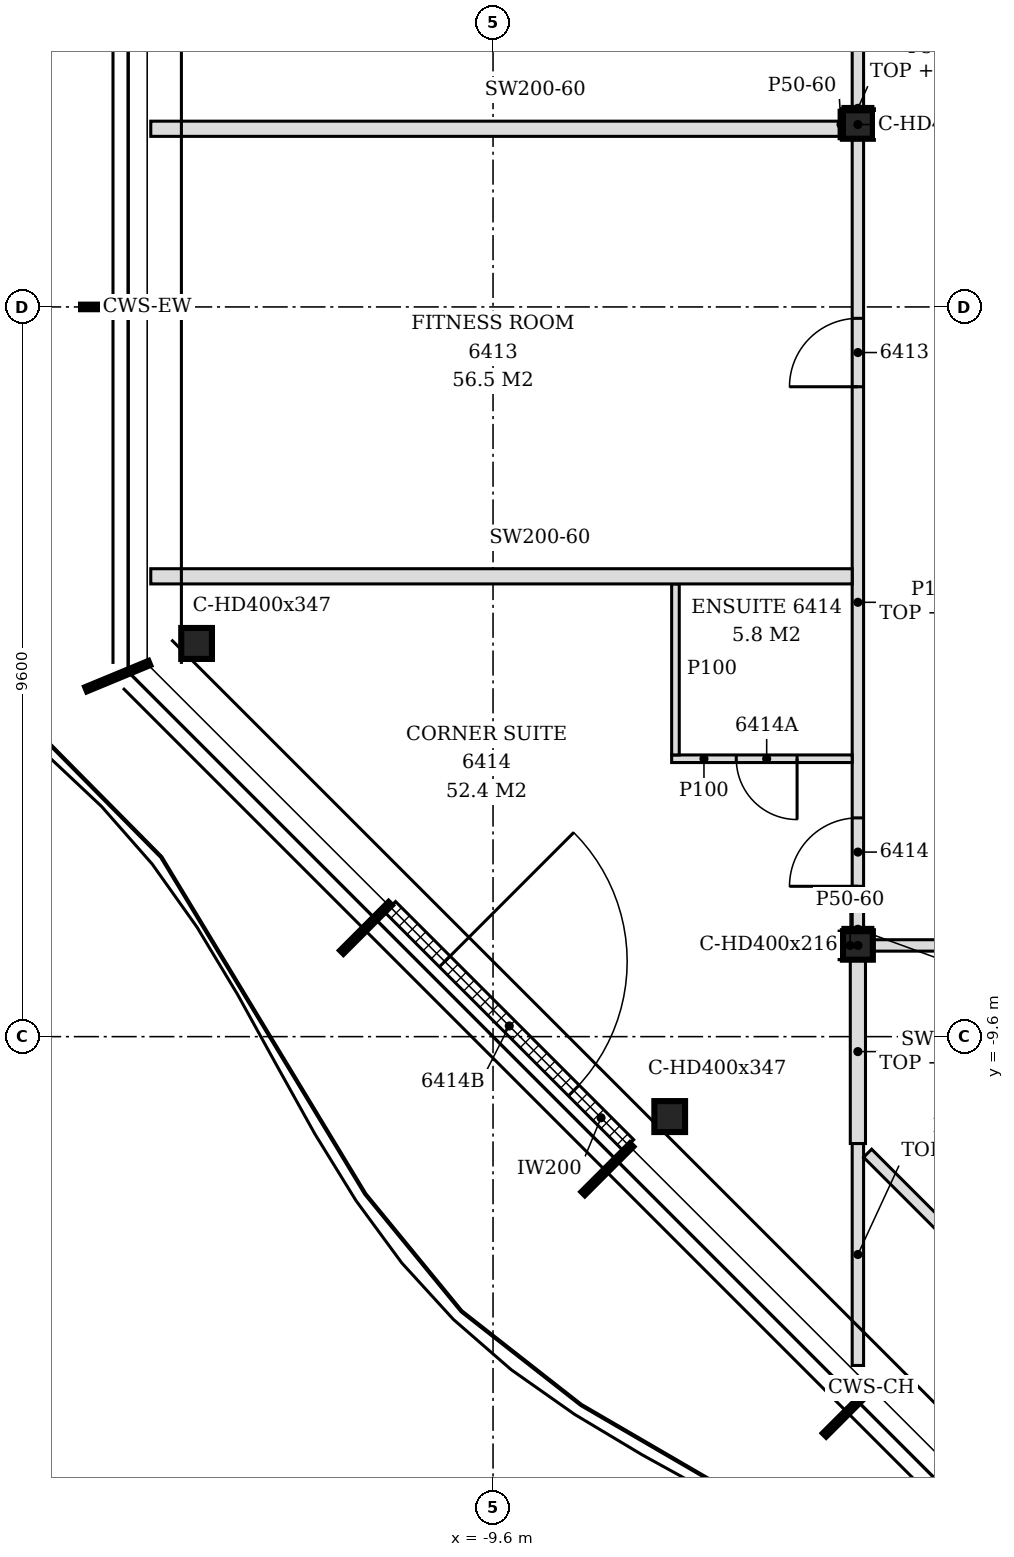
"""IFC4 building model, lengths in metres.
Left out: names, types, materials, properties, quantities, classifications, styles, units other than length and angle.
Written with IfcOpenShell. Run it as: python <this file> out.ifc"""

import sys

from ifc_helpers import new_model, si_unit, direction, frame, frame_2d, origin, origin_2d, place, context, subcontext, project, spatial, polyline, rectangle, i_section, outline, extrude, element, fill, save


model = new_model("IFC4")
c1 = context("Model", 3, precision=1e-05, world=origin(), true_north=direction((0.0, 1.0)))
c2 = subcontext(c1, "Body", "Model", "MODEL_VIEW")
j1 = project(units=[si_unit("LENGTHUNIT", "METRE"), si_unit("PLANEANGLEUNIT", "RADIAN")], contexts=[c1])
p1 = place(None, origin())
s1 = spatial("IfcSite", under=j1, at=p1, CompositionType="ELEMENT")
p2 = place(p1, origin())
s2 = spatial("IfcBuilding", under=s1, at=p2, CompositionType="ELEMENT")
p3 = place(p2, frame((0.0, 0.0, 250.2)))
s3 = spatial("IfcBuildingStorey", under=s2, at=p3, CompositionType="ELEMENT", Elevation=250.2)
for number, where, z_axis, x_axis in (
    (1, (-13.5, -4.427, -0.15), (0.0, 0.0, 1.0), (1.0, 0.0, 0.0)),
    (2, (-7.276, -10.652, -0.15), (0.0, 0.0, 1.0), (1.0, 0.0, 0.0)),
):
    element("IfcColumn", number, at=place(p3, frame(where, z_axis=z_axis, x_axis=x_axis)), inside=s3, PredefinedType="COLUMN", context=c2, shape_type="SweptSolid", body=[
        extrude(i_section(OverallWidth=0.404, OverallDepth=0.407, WebThickness=0.027, FlangeThickness=0.044, FilletRadius=0.015, at=origin_2d()), origin(), (0.0, 0.0, 1.0), 3.6),
    ])
for number, where, z_axis, x_axis in (
    (3, (-4.8, -8.4, -0.15), (0.0, 0.0, 1.0), (1.0, 0.0, 0.0)),
    (4, (-4.8, 2.4, -0.15), (0.0, 0.0, 1.0), (1.0, 0.0, 0.0)),
):
    element("IfcColumn", number, at=place(p3, frame(where, z_axis=z_axis, x_axis=x_axis)), inside=s3, PredefinedType="COLUMN", context=c2, shape_type="SweptSolid", body=[
        extrude(i_section(OverallWidth=0.394, OverallDepth=0.375, WebThickness=0.017, FlangeThickness=0.028, FilletRadius=0.015, at=origin_2d()), origin(), (0.0, 0.0, 1.0), 3.6),
    ])
p4 = place(p3, frame((-10.953, -7.893, 0.0), z_axis=(0.0, 0.0, 1.0), x_axis=(0.707106781187, -0.707106781187, 0.0)))
e5 = element("IfcWall", 5, at=p4, inside=s3, PredefinedType="NOTDEFINED", context=c2, shape_type="SweptSolid", body=[
    extrude(rectangle(XDim=4.431, YDim=0.2, at=frame_2d((2.215, 0.0))), origin(), (0.0, 0.0, 1.0), 3.45),
])
p5 = place(p4, frame((1.015, 0.0, 0.0)))
e6 = element("IfcOpeningElement", 6, at=p5, cuts=e5, PredefinedType="OPENING", context=c2, shape_type="SweptSolid", body=[
    extrude(rectangle(XDim=2.4, YDim=2.4, at=frame_2d((1.2, 1.2))), frame((0.0, 0.11, 0.0), z_axis=(0.0, -1.0, 0.0), x_axis=(1.0, 0.0, 0.0)), (0.0, 0.0, 1.0), 0.22),
])
p6 = place(p3, frame((-4.8, -13.926, 0.0), z_axis=(0.0, 0.0, 1.0), x_axis=(0.0, 1.0, 0.0)))
e7 = element("IfcWall", 7, at=p6, inside=s3, PredefinedType="PARTITIONING", context=c2, shape_type="SweptSolid", body=[
    extrude(outline(polyline([(0.0, 0.0), (2.92, 0.0), (2.92, 3.03), (1.369, 3.03), (1.367, 2.63), (0.229, 2.63), (0.227, 3.03), (0.0, 3.03), (0.0, 0.0)])), frame((0.0, 0.075, 0.0), z_axis=(0.0, -1.0, 0.0), x_axis=(1.0, 0.0, 0.0)), (0.0, 0.0, 1.0), 0.15),
])
p7 = place(p3, frame((-2.734, -13.072, 0.0), z_axis=(0.0, 0.0, 1.0), x_axis=(-0.707151316332, 0.707062243236, 0.0)))
e8 = element("IfcWall", 8, at=p7, inside=s3, PredefinedType="PARTITIONING", context=c2, shape_type="SweptSolid", body=[
    extrude(rectangle(XDim=2.741, YDim=0.15, at=frame_2d((1.371, 0.0))), origin(), (0.0, 0.0, 1.0), 3.03),
])
p8 = place(p3, frame((-4.8, -11.006, 0.0), z_axis=(0.0, 0.0, 1.0), x_axis=(0.0, 1.0, 0.0)))
e9 = element("IfcWall", 9, at=p8, inside=s3, PredefinedType="PARTITIONING", context=c2, shape_type="SweptSolid", body=[
    extrude(rectangle(XDim=2.419, YDim=0.2, at=frame_2d((1.209, 0.0))), origin(), (0.0, 0.0, 1.0), 3.03),
])
p9 = place(p3, frame((-4.603, -8.4, 0.0), z_axis=(0.0, 0.0, 1.0), x_axis=(1.0, 0.0, 0.0)))
e10 = element("IfcWall", 10, at=p9, inside=s3, PredefinedType="PARTITIONING", context=c2, shape_type="SweptSolid", body=[
    extrude(rectangle(XDim=4.678, YDim=0.15, at=frame_2d((2.339, 0.0))), origin(), (0.0, 0.0, 1.0), 2.83),
])
p10 = place(p9, frame((1.753, 0.0, 0.0)))
e11 = element("IfcOpeningElement", 11, at=p10, cuts=e10, PredefinedType="OPENING", context=c2, shape_type="SweptSolid", body=[
    extrude(rectangle(XDim=0.9, YDim=2.1, at=frame_2d((0.45, 1.05))), frame((0.0, 0.085, 0.0), z_axis=(0.0, -1.0, 0.0), x_axis=(1.0, 0.0, 0.0)), (0.0, 0.0, 1.0), 0.17),
])
p11 = place(p3, frame((-4.8, -8.212, 0.0), z_axis=(0.0, 0.0, 1.0), x_axis=(0.0, 1.0, 0.0)))
e12 = element("IfcWall", 12, at=p11, inside=s3, PredefinedType="PARTITIONING", context=c2, shape_type="SweptSolid", body=[
    extrude(rectangle(XDim=10.425, YDim=0.15, at=frame_2d((5.212, 0.0))), origin(), (0.0, 0.0, 1.0), 2.83),
])
p12 = place(p11, frame((7.163, 0.0, 0.0)))
e13 = element("IfcOpeningElement", 13, at=p12, cuts=e12, PredefinedType="OPENING", context=c2, shape_type="SweptSolid", body=[
    extrude(rectangle(XDim=0.9, YDim=2.1, at=frame_2d((0.45, 1.05))), frame((0.0, 0.085, 0.0), z_axis=(0.0, -1.0, 0.0), x_axis=(1.0, 0.0, 0.0)), (0.0, 0.0, 1.0), 0.17),
])
p13 = place(p11, frame((0.591, 0.0, 0.0)))
e14 = element("IfcOpeningElement", 14, at=p13, cuts=e12, PredefinedType="OPENING", context=c2, shape_type="SweptSolid", body=[
    extrude(rectangle(XDim=0.9, YDim=2.1, at=frame_2d((0.45, 1.05))), frame((0.0, 0.085, 0.0), z_axis=(0.0, -1.0, 0.0), x_axis=(1.0, 0.0, 0.0)), (0.0, 0.0, 1.0), 0.17),
])
p14 = place(p3, frame((-7.25, -5.944, 0.0), z_axis=(0.0, 0.0, 1.0), x_axis=(1.0, 0.0, 0.0)))
e15 = element("IfcWall", 15, at=p14, inside=s3, PredefinedType="PARTITIONING", context=c2, shape_type="SweptSolid", body=[
    extrude(outline(polyline([(0.0, 0.0), (2.375, 0.0), (2.375, 2.83), (2.3, 2.83), (2.298, 3.45), (0.0, 3.45), (0.0, 0.0)])), frame((0.0, 0.05, 0.0), z_axis=(0.0, -1.0, 0.0), x_axis=(1.0, 0.0, 0.0)), (0.0, 0.0, 1.0), 0.1),
])
p15 = place(p14, frame((0.85, 0.0, 0.0)))
e16 = element("IfcOpeningElement", 16, at=p15, cuts=e15, PredefinedType="OPENING", context=c2, shape_type="SweptSolid", body=[
    extrude(rectangle(XDim=0.8, YDim=2.1, at=frame_2d((0.4, 1.05))), frame((0.0, 0.06, 0.0), z_axis=(0.0, -1.0, 0.0), x_axis=(1.0, 0.0, 0.0)), (0.0, 0.0, 1.0), 0.12),
])
p16 = place(p3, frame((-7.2, -5.894, 0.0), z_axis=(0.0, 0.0, 1.0), x_axis=(0.0, 1.0, 0.0)))
e17 = element("IfcWall", 17, at=p16, inside=s3, PredefinedType="PARTITIONING", context=c2, shape_type="SweptSolid", body=[
    extrude(outline(polyline([(0.0, 0.0), (2.25, 0.0), (2.25, 3.45), (1.189, 3.45), (1.187, 2.98), (0.999, 2.98), (0.997, 3.45), (0.0, 3.45), (0.0, 0.0)])), frame((0.0, 0.05, 0.0), z_axis=(0.0, -1.0, 0.0), x_axis=(1.0, 0.0, 0.0)), (0.0, 0.0, 1.0), 0.1),
])
p17 = place(p3, frame((-14.103, -3.544, 0.0), z_axis=(0.0, 0.0, 1.0), x_axis=(1.0, 0.0, 0.0)))
e18 = element("IfcWall", 18, at=p17, inside=s3, PredefinedType="PARTITIONING", context=c2, shape_type="SweptSolid", body=[
    extrude(outline(polyline([(0.0, 0.0), (9.228, 0.0), (9.228, 2.83), (9.153, 2.83), (9.151, 3.45), (0.753, 3.45), (0.751, 2.93), (0.453, 2.93), (0.451, 3.45), (0.0, 3.45), (0.0, 0.0)])), frame((0.0, 0.1, 0.0), z_axis=(0.0, -1.0, 0.0), x_axis=(1.0, 0.0, 0.0)), (0.0, 0.0, 1.0), 0.2),
])
p18 = place(p3, frame((-14.103, 2.344, 0.0), z_axis=(0.0, 0.0, 1.0), x_axis=(1.0, 0.0, 0.0)))
e19 = element("IfcWall", 19, at=p18, inside=s3, PredefinedType="PARTITIONING", context=c2, shape_type="SweptSolid", body=[
    extrude(outline(polyline([(0.0, 0.0), (9.106, 0.0), (9.106, 3.45), (0.753, 3.45), (0.751, 2.93), (0.453, 2.93), (0.451, 3.45), (0.0, 3.45), (0.0, 0.0)])), frame((0.0, 0.1, 0.0), z_axis=(0.0, -1.0, 0.0), x_axis=(1.0, 0.0, 0.0)), (0.0, 0.0, 1.0), 0.2),
])
p19 = place(p3, frame((-4.8, 2.587, 0.0), z_axis=(0.0, 0.0, 1.0), x_axis=(0.0, 1.0, 0.0)))
e20 = element("IfcWall", 20, at=p19, inside=s3, PredefinedType="PARTITIONING", context=c2, shape_type="SweptSolid", body=[
    extrude(outline(polyline([(0.0, 0.0), (10.425, 0.0), (10.425, 2.63), (9.97, 2.63), (9.968, 2.83), (0.0, 2.83), (0.0, 0.0)])), frame((0.0, 0.075, 0.0), z_axis=(0.0, -1.0, 0.0), x_axis=(1.0, 0.0, 0.0)), (0.0, 0.0, 1.0), 0.15),
])
for number, where, z_axis, x_axis in (
    (21, (-5.022, -8.587, 0.0), (0.0, 0.0, 1.0), (0.0, 1.0, 0.0)),
    (22, (-5.022, 2.212, 0.0), (0.0, 0.0, 1.0), (0.0, 1.0, 0.0)),
):
    element("IfcWall", number, at=place(p3, frame(where, z_axis=z_axis, x_axis=x_axis)), inside=s3, PredefinedType="PARTITIONING", context=c2, shape_type="SweptSolid", body=[
        extrude(rectangle(XDim=0.375, YDim=0.05, at=frame_2d((0.188, 0.0))), origin(), (0.0, 0.0, 1.0), 3.45),
    ])
for number, where, z_axis, x_axis in (
    (23, (-4.997, -8.188, 0.0), (0.0, 0.0, 1.0), (1.0, 0.0, 0.0)),
    (24, (-4.997, 2.613, 0.0), (0.0, 0.0, 1.0), (1.0, 0.0, 0.0)),
):
    element("IfcWall", number, at=place(p3, frame(where, z_axis=z_axis, x_axis=x_axis)), inside=s3, PredefinedType="PARTITIONING", context=c2, shape_type="SweptSolid", body=[
        extrude(rectangle(XDim=0.394, YDim=0.05, at=frame_2d((0.197, 0.0))), origin(), (0.0, 0.0, 1.0), 2.83),
    ])
p20 = place(p5, origin())
e25 = element("IfcDoor", 25, at=p20, inside=s3, OperationType="SINGLE_SWING_LEFT", PredefinedType="DOOR", context=c2, shape_type="SweptSolid", body=[
    extrude(rectangle(XDim=2.4, YDim=2.4, at=frame_2d((1.2, 1.2))), frame((0.0, 0.025, 0.0), z_axis=(0.0, -1.0, 0.0), x_axis=(1.0, 0.0, 0.0)), (0.0, 0.0, 1.0), 0.05),
])
fill(e6, e25)
p21 = place(p12, origin())
e26 = element("IfcDoor", 26, at=p21, inside=s3, OperationType="SINGLE_SWING_LEFT", PredefinedType="DOOR", context=c2, shape_type="SweptSolid", body=[
    extrude(rectangle(XDim=0.9, YDim=2.1, at=frame_2d((0.45, 1.05))), frame((0.0, 0.025, 0.0), z_axis=(0.0, -1.0, 0.0), x_axis=(1.0, 0.0, 0.0)), (0.0, 0.0, 1.0), 0.05),
])
fill(e13, e26)
p22 = place(p13, origin())
e27 = element("IfcDoor", 27, at=p22, inside=s3, OperationType="SINGLE_SWING_LEFT", PredefinedType="DOOR", context=c2, shape_type="SweptSolid", body=[
    extrude(rectangle(XDim=0.9, YDim=2.1, at=frame_2d((0.45, 1.05))), frame((0.0, 0.025, 0.0), z_axis=(0.0, -1.0, 0.0), x_axis=(1.0, 0.0, 0.0)), (0.0, 0.0, 1.0), 0.05),
])
fill(e14, e27)
p23 = place(p15, frame((0.8, 0.0, 0.0), z_axis=(0.0, 0.0, 1.0), x_axis=(-1.0, 0.0, 0.0)))
e28 = element("IfcDoor", 28, at=p23, inside=s3, OperationType="SINGLE_SWING_LEFT", PredefinedType="DOOR", context=c2, shape_type="SweptSolid", body=[
    extrude(rectangle(XDim=0.8, YDim=2.1, at=frame_2d((0.4, 1.05))), frame((0.0, 0.025, 0.0), z_axis=(0.0, -1.0, 0.0), x_axis=(1.0, 0.0, 0.0)), (0.0, 0.0, 1.0), 0.05),
])
fill(e16, e28)
save(model, sys.argv[1])
